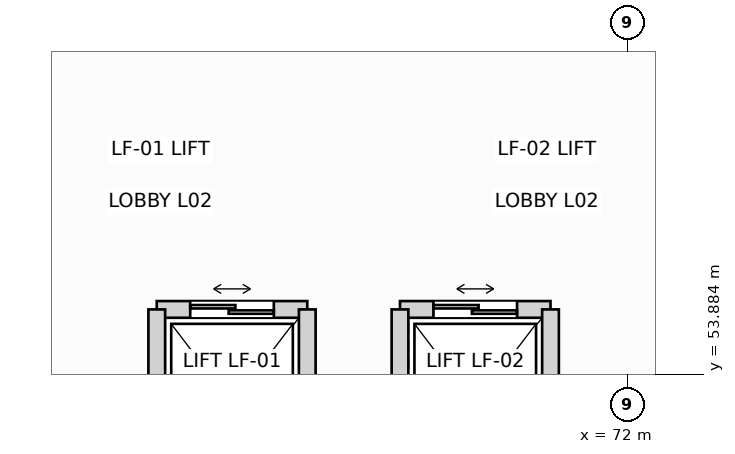
"""IFC4 building model, lengths in metres.
Left out: names, types, materials, properties, quantities, classifications, styles, units other than length and angle.
Written with IfcOpenShell. Run it as: python <this file> out.ifc"""

import sys

from ifc_helpers import new_model, si_unit, direction, frame, frame_2d, origin, place, context, subcontext, project, spatial, rectangle, extrude, element, fill, save


model = new_model("IFC4")
c1 = context("Model", 3, precision=1e-05, world=origin(), true_north=direction((0.0, 1.0)))
c2 = subcontext(c1, "Body", "Model", "MODEL_VIEW")
j1 = project(units=[si_unit("LENGTHUNIT", "METRE"), si_unit("PLANEANGLEUNIT", "RADIAN")], contexts=[c1])
p1 = place(None, origin())
s1 = spatial("IfcSite", under=j1, at=p1, CompositionType="ELEMENT")
p2 = place(p1, origin())
s2 = spatial("IfcBuilding", under=s1, at=p2, CompositionType="ELEMENT")
p3 = place(p2, frame((0.0, 0.0, 11.4)))
s3 = spatial("IfcBuildingStorey", under=s2, at=p3, CompositionType="ELEMENT", Elevation=11.4)
p4 = place(p3, frame((65.81, 54.74, 0.0), z_axis=(0.0, 0.0, 1.0), x_axis=(1.0, 0.0, 0.0)))
e1 = element("IfcWall", 1, at=p4, inside=s3, PredefinedType="PARTITIONING", context=c2, shape_type="SweptSolid", body=[
    extrude(rectangle(XDim=1.98, YDim=0.22, at=frame_2d((0.99, 0.0))), origin(), (0.0, 0.0, 1.0), 5.085),
])
p5 = place(p4, frame((0.44, 0.0, 0.0)))
e2 = element("IfcOpeningElement", 2, at=p5, cuts=e1, PredefinedType="OPENING", context=c2, shape_type="SweptSolid", body=[
    extrude(rectangle(XDim=1.1, YDim=2.18, at=frame_2d((0.55, 1.09))), frame((0.0, 0.12, 0.0), z_axis=(0.0, -1.0, 0.0), x_axis=(1.0, 0.0, 0.0)), (0.0, 0.0, 1.0), 0.24),
])
for number, where, z_axis, x_axis in (
    (3, (65.81, 52.26, 0.0), (0.0, 0.0, 1.0), (0.0, 1.0, 0.0)),
    (4, (67.79, 52.26, 0.0), (0.0, 0.0, 1.0), (0.0, 1.0, 0.0)),
):
    element("IfcWall", number, at=place(p3, frame(where, z_axis=z_axis, x_axis=x_axis)), inside=s3, PredefinedType="PARTITIONING", context=c2, shape_type="SweptSolid", body=[
        extrude(rectangle(XDim=2.48, YDim=0.22, at=frame_2d((1.24, 0.0))), origin(), (0.0, 0.0, 1.0), 5.085),
    ])
p6 = place(p3, frame((69.01, 54.74, 0.0), z_axis=(0.0, 0.0, 1.0), x_axis=(1.0, 0.0, 0.0)))
e5 = element("IfcWall", 5, at=p6, inside=s3, PredefinedType="PARTITIONING", context=c2, shape_type="SweptSolid", body=[
    extrude(rectangle(XDim=1.98, YDim=0.22, at=frame_2d((0.99, 0.0))), origin(), (0.0, 0.0, 1.0), 5.085),
])
p7 = place(p6, frame((0.44, 0.0, 0.0)))
e6 = element("IfcOpeningElement", 6, at=p7, cuts=e5, PredefinedType="OPENING", context=c2, shape_type="SweptSolid", body=[
    extrude(rectangle(XDim=1.1, YDim=2.18, at=frame_2d((0.55, 1.09))), frame((0.0, 0.12, 0.0), z_axis=(0.0, -1.0, 0.0), x_axis=(1.0, 0.0, 0.0)), (0.0, 0.0, 1.0), 0.24),
])
for number, where, z_axis, x_axis in (
    (7, (69.01, 52.26, 0.0), (0.0, 0.0, 1.0), (0.0, 1.0, 0.0)),
    (8, (70.99, 52.26, 0.0), (0.0, 0.0, 1.0), (0.0, 1.0, 0.0)),
):
    element("IfcWall", number, at=place(p3, frame(where, z_axis=z_axis, x_axis=x_axis)), inside=s3, PredefinedType="PARTITIONING", context=c2, shape_type="SweptSolid", body=[
        extrude(rectangle(XDim=2.48, YDim=0.22, at=frame_2d((1.24, 0.0))), origin(), (0.0, 0.0, 1.0), 5.085),
    ])
p8 = place(p5, origin())
e9 = element("IfcDoor", 9, at=p8, inside=s3, OperationType="DOUBLE_DOOR_SLIDING", PredefinedType="DOOR", context=c2, shape_type="SweptSolid", body=[
    extrude(rectangle(XDim=1.1, YDim=2.18, at=frame_2d((0.55, 1.09))), frame((0.0, 0.025, 0.0), z_axis=(0.0, -1.0, 0.0), x_axis=(1.0, 0.0, 0.0)), (0.0, 0.0, 1.0), 0.05),
])
fill(e2, e9)
p9 = place(p7, origin())
e10 = element("IfcDoor", 10, at=p9, inside=s3, OperationType="DOUBLE_DOOR_SLIDING", PredefinedType="DOOR", context=c2, shape_type="SweptSolid", body=[
    extrude(rectangle(XDim=1.1, YDim=2.18, at=frame_2d((0.55, 1.09))), frame((0.0, 0.025, 0.0), z_axis=(0.0, -1.0, 0.0), x_axis=(1.0, 0.0, 0.0)), (0.0, 0.0, 1.0), 0.05),
])
fill(e6, e10)
save(model, sys.argv[1])
